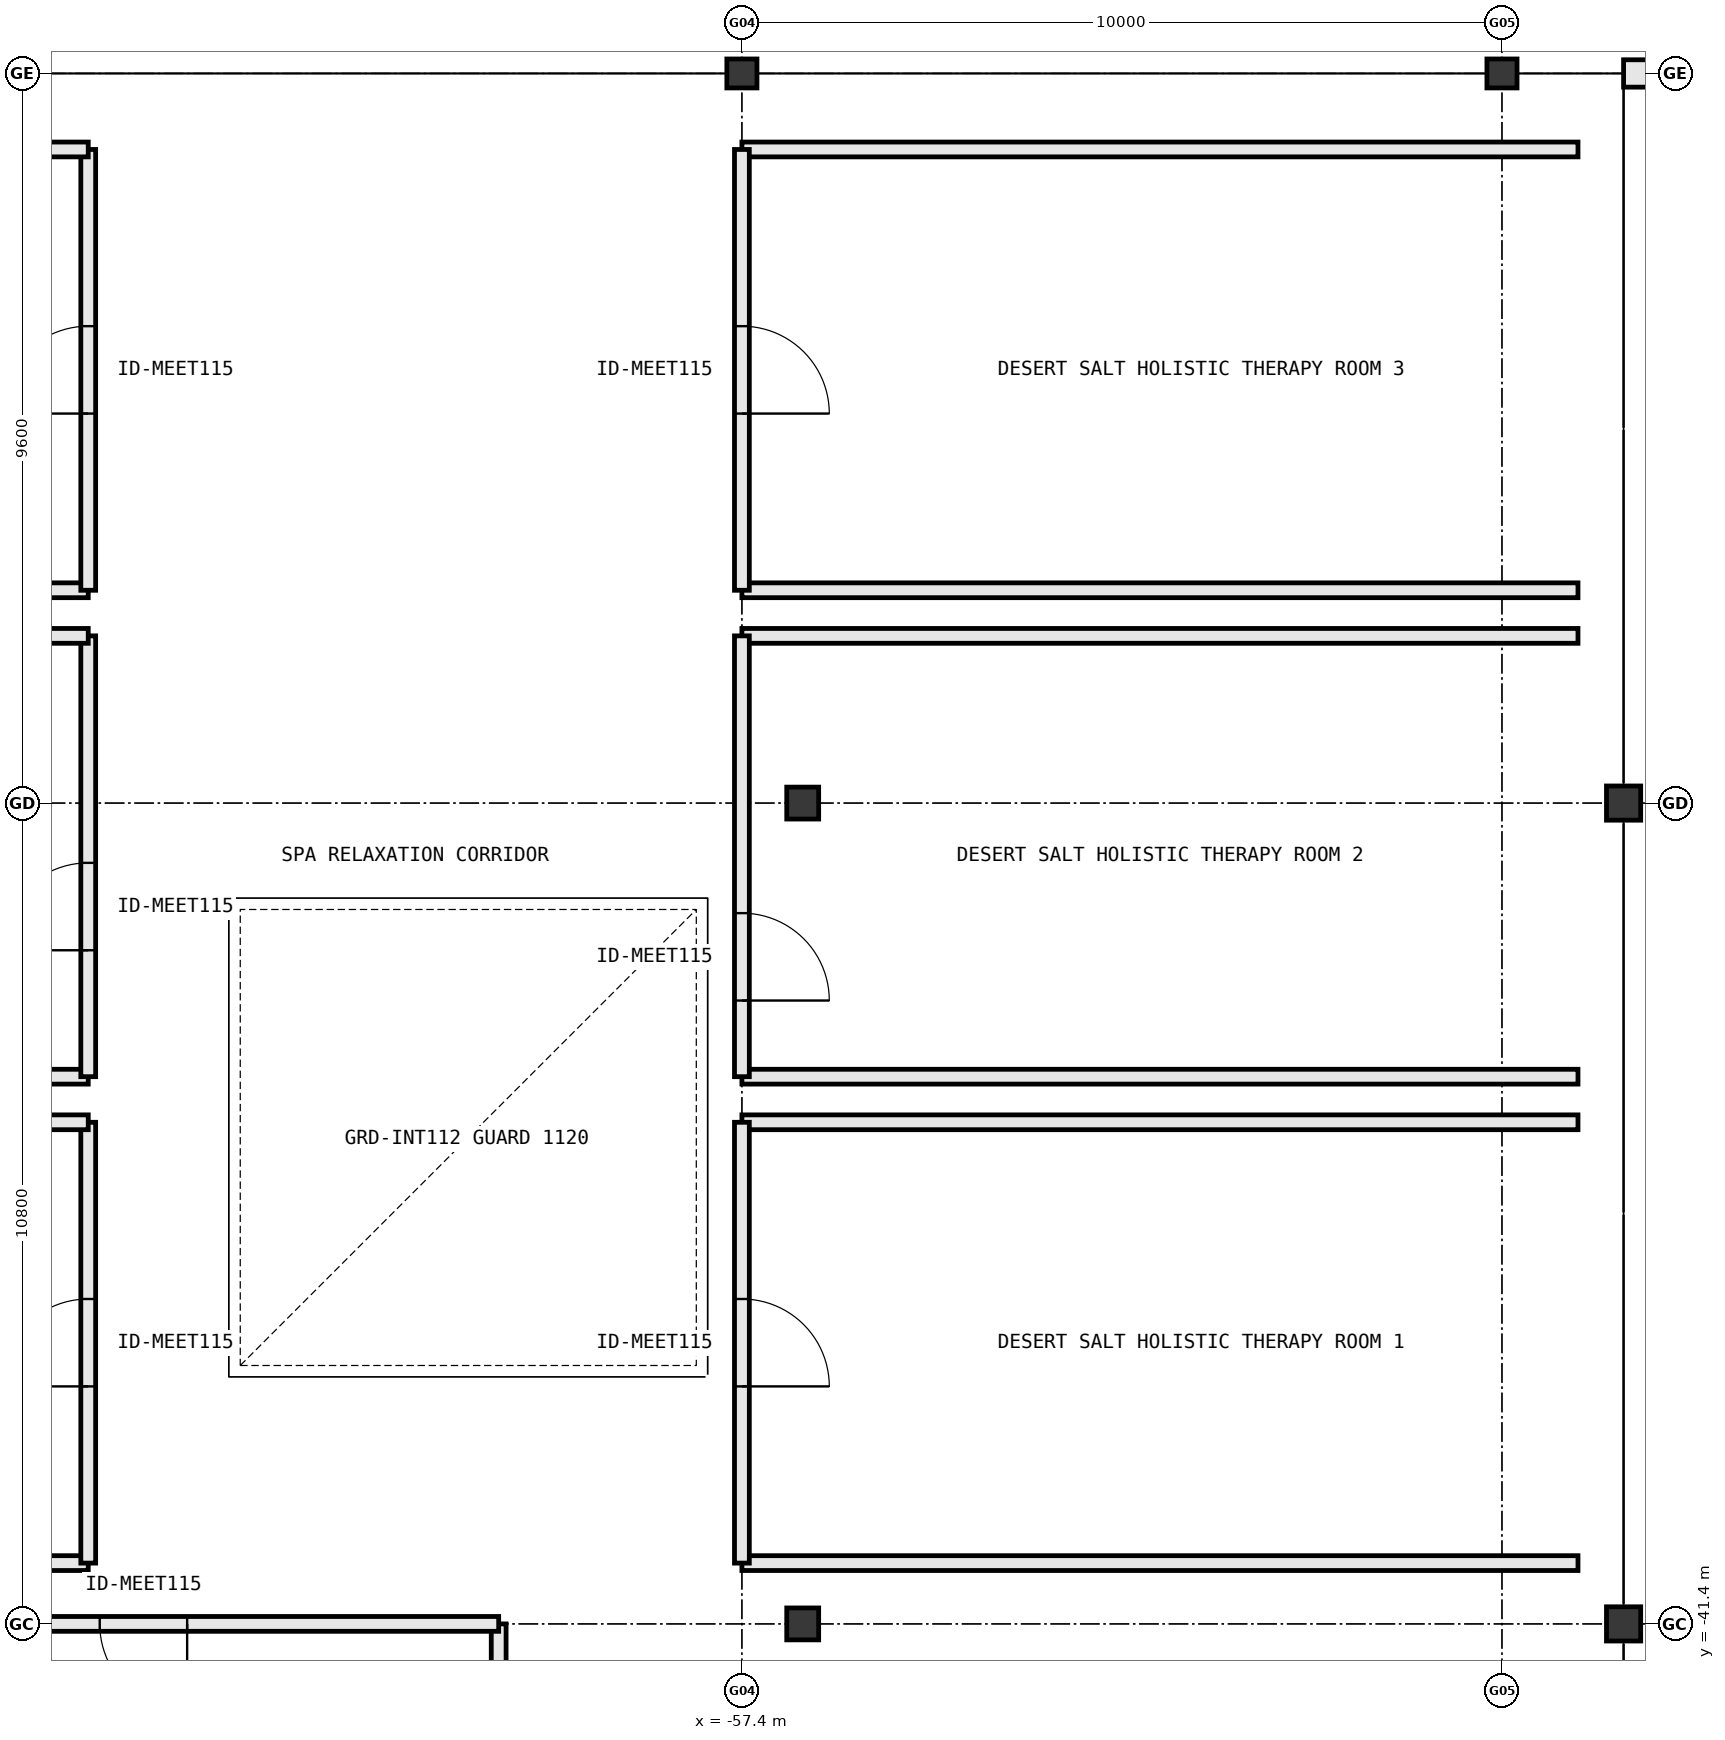
"""IFC4 building model, lengths in metres.
Left out: names, types, materials, properties, quantities, classifications, styles, units other than length and angle.
Written with IfcOpenShell. Run it as: python <this file> out.ifc"""

import sys

from ifc_helpers import new_model, si_unit, direction, frame, frame_2d, origin, origin_2d, place, context, subcontext, project, spatial, rectangle, i_section, extrude, element, fill, save


model = new_model("IFC4")
c1 = context("Model", 3, precision=1e-05, world=origin(), true_north=direction((0.0, 1.0)))
c2 = subcontext(c1, "Body", "Model", "MODEL_VIEW")
j1 = project(units=[si_unit("LENGTHUNIT", "METRE"), si_unit("PLANEANGLEUNIT", "RADIAN")], contexts=[c1])
p1 = place(None, origin())
s1 = spatial("IfcSite", under=j1, at=p1, CompositionType="ELEMENT")
p2 = place(p1, origin())
s2 = spatial("IfcBuilding", under=s1, at=p2, CompositionType="ELEMENT")
p3 = place(p2, frame((0.0, 0.0, 5.4)))
s3 = spatial("IfcBuildingStorey", under=s2, at=p3, CompositionType="ELEMENT", Elevation=5.4)
for number, where, z_axis, x_axis in (
    (1, (-57.4, -21.0, 0.0), (0.0, 0.0, 1.0), (1.0, 0.0, 0.0)),
    (2, (-47.4, -21.0, 0.0), (0.0, 0.0, 1.0), (1.0, 0.0, 0.0)),
):
    element("IfcColumn", number, at=place(p3, frame(where, z_axis=z_axis, x_axis=x_axis)), inside=s3, PredefinedType="COLUMN", context=c2, shape_type="SweptSolid", body=[
        extrude(i_section(OverallWidth=0.396, OverallDepth=0.381, WebThickness=0.019, FlangeThickness=0.03, at=origin_2d()), origin(), (0.0, 0.0, 1.0), 5.4),
    ])
for number, where, z_axis, x_axis in (
    (3, (-56.6, -41.4, 0.0), (0.0, 0.0, 1.0), (1.0, 0.0, 0.0)),
    (4, (-56.6, -30.6, 0.0), (0.0, 0.0, 1.0), (1.0, 0.0, 0.0)),
):
    element("IfcColumn", number, at=place(p3, frame(where, z_axis=z_axis, x_axis=x_axis)), inside=s3, PredefinedType="COLUMN", context=c2, shape_type="SweptSolid", body=[
        extrude(rectangle(XDim=0.42, YDim=0.42, at=origin_2d()), origin(), (0.0, 0.0, 1.0), 5.4),
    ])
for number, where, z_axis, x_axis in (
    (5, (-45.8, -41.4, 0.0), (0.0, 0.0, 1.0), (1.0, 0.0, 0.0)),
    (6, (-45.8, -30.6, 0.0), (0.0, 0.0, 1.0), (1.0, 0.0, 0.0)),
):
    element("IfcColumn", number, at=place(p3, frame(where, z_axis=z_axis, x_axis=x_axis)), inside=s3, PredefinedType="COLUMN", context=c2, shape_type="SweptSolid", body=[
        extrude(rectangle(XDim=0.45, YDim=0.45, at=origin_2d()), origin(), (0.0, 0.0, 1.0), 5.4),
    ])
p4 = place(p3, frame((-45.8, -21.0, 0.0), z_axis=(0.0, 0.0, 1.0), x_axis=(1.0, 0.0, 0.0)))
e7 = element("IfcWall", 7, at=p4, inside=s3, PredefinedType="STANDARD", context=c2, shape_type="SweptSolid", body=[
    extrude(rectangle(XDim=8.393, YDim=0.36, at=frame_2d((4.196, 0.0))), origin(), (0.0, 0.0, 1.0), 4.424),
])
p5 = place(p4, frame((2.846, 0.0, 0.85)))
e8 = element("IfcOpeningElement", 8, at=p5, cuts=e7, PredefinedType="OPENING", context=c2, shape_type="SweptSolid", body=[
    extrude(rectangle(XDim=2.7, YDim=2.15, at=frame_2d((1.35, 1.075))), frame((0.0, 0.192, 0.0), z_axis=(0.0, -1.0, 0.0), x_axis=(1.0, 0.0, 0.0)), (0.0, 0.0, 1.0), 0.384),
])
p6 = place(p3, frame((-77.6, -40.6, 0.0), z_axis=(0.0, 0.0, 1.0), x_axis=(1.0, 0.0, 0.0)))
e9 = element("IfcWall", 9, at=p6, inside=s3, PredefinedType="PARTITIONING", context=c2, shape_type="SweptSolid", body=[
    extrude(rectangle(XDim=11.6, YDim=0.195, at=frame_2d((5.8, 0.0))), origin(), (0.0, 0.0, 1.0), 5.13),
])
p7 = place(p3, frame((-66.0, -40.6, 0.0), z_axis=(0.0, 0.0, 1.0), x_axis=(0.0, 1.0, 0.0)))
e10 = element("IfcWall", 10, at=p7, inside=s3, PredefinedType="PARTITIONING", context=c2, shape_type="SweptSolid", body=[
    extrude(rectangle(XDim=5.8, YDim=0.195, at=frame_2d((2.9, 0.0))), origin(), (0.0, 0.0, 1.0), 5.13),
])
p8 = place(p7, frame((2.325, 0.0, 0.0)))
e11 = element("IfcOpeningElement", 11, at=p8, cuts=e10, PredefinedType="OPENING", context=c2, shape_type="SweptSolid", body=[
    extrude(rectangle(XDim=1.15, YDim=2.2, at=frame_2d((0.575, 1.1))), frame((0.0, 0.11, 0.0), z_axis=(0.0, -1.0, 0.0), x_axis=(1.0, 0.0, 0.0)), (0.0, 0.0, 1.0), 0.219),
])
p9 = place(p3, frame((-66.0, -34.8, 0.0), z_axis=(0.0, 0.0, 1.0), x_axis=(-1.0, 0.0, 0.0)))
e12 = element("IfcWall", 12, at=p9, inside=s3, PredefinedType="PARTITIONING", context=c2, shape_type="SweptSolid", body=[
    extrude(rectangle(XDim=11.6, YDim=0.195, at=frame_2d((5.8, 0.0))), origin(), (0.0, 0.0, 1.0), 5.13),
])
for number, where, z_axis, x_axis in (
    (13, (-57.4, -40.6, 0.0), (0.0, 0.0, 1.0), (1.0, 0.0, 0.0)),
    (14, (-46.4, -34.8, 0.0), (0.0, 0.0, 1.0), (-1.0, 0.0, 0.0)),
):
    element("IfcWall", number, at=place(p3, frame(where, z_axis=z_axis, x_axis=x_axis)), inside=s3, PredefinedType="PARTITIONING", context=c2, shape_type="SweptSolid", body=[
        extrude(rectangle(XDim=11.0, YDim=0.195, at=frame_2d((5.5, 0.0))), origin(), (0.0, 0.0, 1.0), 5.13),
    ])
p10 = place(p3, frame((-57.4, -34.8, 0.0), z_axis=(0.0, 0.0, 1.0), x_axis=(0.0, -1.0, 0.0)))
e15 = element("IfcWall", 15, at=p10, inside=s3, PredefinedType="PARTITIONING", context=c2, shape_type="SweptSolid", body=[
    extrude(rectangle(XDim=5.8, YDim=0.195, at=frame_2d((2.9, 0.0))), origin(), (0.0, 0.0, 1.0), 5.13),
])
p11 = place(p10, frame((2.325, 0.0, 0.0)))
e16 = element("IfcOpeningElement", 16, at=p11, cuts=e15, PredefinedType="OPENING", context=c2, shape_type="SweptSolid", body=[
    extrude(rectangle(XDim=1.15, YDim=2.2, at=frame_2d((0.575, 1.1))), frame((0.0, 0.11, 0.0), z_axis=(0.0, -1.0, 0.0), x_axis=(1.0, 0.0, 0.0)), (0.0, 0.0, 1.0), 0.219),
])
p12 = place(p3, frame((-77.6, -34.2, 0.0), z_axis=(0.0, 0.0, 1.0), x_axis=(1.0, 0.0, 0.0)))
e17 = element("IfcWall", 17, at=p12, inside=s3, PredefinedType="PARTITIONING", context=c2, shape_type="SweptSolid", body=[
    extrude(rectangle(XDim=11.6, YDim=0.195, at=frame_2d((5.8, 0.0))), origin(), (0.0, 0.0, 1.0), 5.13),
])
p13 = place(p3, frame((-66.0, -34.2, 0.0), z_axis=(0.0, 0.0, 1.0), x_axis=(0.0, 1.0, 0.0)))
e18 = element("IfcWall", 18, at=p13, inside=s3, PredefinedType="PARTITIONING", context=c2, shape_type="SweptSolid", body=[
    extrude(rectangle(XDim=5.8, YDim=0.195, at=frame_2d((2.9, 0.0))), origin(), (0.0, 0.0, 1.0), 5.13),
])
p14 = place(p13, frame((1.664, 0.0, 0.0)))
e19 = element("IfcOpeningElement", 19, at=p14, cuts=e18, PredefinedType="OPENING", context=c2, shape_type="SweptSolid", body=[
    extrude(rectangle(XDim=1.15, YDim=2.2, at=frame_2d((0.575, 1.1))), frame((0.0, 0.11, 0.0), z_axis=(0.0, -1.0, 0.0), x_axis=(1.0, 0.0, 0.0)), (0.0, 0.0, 1.0), 0.219),
])
p15 = place(p3, frame((-66.0, -28.4, 0.0), z_axis=(0.0, 0.0, 1.0), x_axis=(-1.0, 0.0, 0.0)))
e20 = element("IfcWall", 20, at=p15, inside=s3, PredefinedType="PARTITIONING", context=c2, shape_type="SweptSolid", body=[
    extrude(rectangle(XDim=11.6, YDim=0.195, at=frame_2d((5.8, 0.0))), origin(), (0.0, 0.0, 1.0), 5.13),
])
for number, where, z_axis, x_axis in (
    (21, (-57.4, -34.2, 0.0), (0.0, 0.0, 1.0), (1.0, 0.0, 0.0)),
    (22, (-46.4, -28.4, 0.0), (0.0, 0.0, 1.0), (-1.0, 0.0, 0.0)),
):
    element("IfcWall", number, at=place(p3, frame(where, z_axis=z_axis, x_axis=x_axis)), inside=s3, PredefinedType="PARTITIONING", context=c2, shape_type="SweptSolid", body=[
        extrude(rectangle(XDim=11.0, YDim=0.195, at=frame_2d((5.5, 0.0))), origin(), (0.0, 0.0, 1.0), 5.13),
    ])
p16 = place(p3, frame((-57.4, -28.4, 0.0), z_axis=(0.0, 0.0, 1.0), x_axis=(0.0, -1.0, 0.0)))
e23 = element("IfcWall", 23, at=p16, inside=s3, PredefinedType="PARTITIONING", context=c2, shape_type="SweptSolid", body=[
    extrude(rectangle(XDim=5.8, YDim=0.195, at=frame_2d((2.9, 0.0))), origin(), (0.0, 0.0, 1.0), 5.13),
])
p17 = place(p16, frame((3.648, 0.0, 0.0)))
e24 = element("IfcOpeningElement", 24, at=p17, cuts=e23, PredefinedType="OPENING", context=c2, shape_type="SweptSolid", body=[
    extrude(rectangle(XDim=1.15, YDim=2.2, at=frame_2d((0.575, 1.1))), frame((0.0, 0.11, 0.0), z_axis=(0.0, -1.0, 0.0), x_axis=(1.0, 0.0, 0.0)), (0.0, 0.0, 1.0), 0.219),
])
p18 = place(p3, frame((-77.6, -27.8, 0.0), z_axis=(0.0, 0.0, 1.0), x_axis=(1.0, 0.0, 0.0)))
e25 = element("IfcWall", 25, at=p18, inside=s3, PredefinedType="PARTITIONING", context=c2, shape_type="SweptSolid", body=[
    extrude(rectangle(XDim=11.6, YDim=0.195, at=frame_2d((5.8, 0.0))), origin(), (0.0, 0.0, 1.0), 5.13),
])
p19 = place(p3, frame((-66.0, -27.8, 0.0), z_axis=(0.0, 0.0, 1.0), x_axis=(0.0, 1.0, 0.0)))
e26 = element("IfcWall", 26, at=p19, inside=s3, PredefinedType="PARTITIONING", context=c2, shape_type="SweptSolid", body=[
    extrude(rectangle(XDim=5.8, YDim=0.195, at=frame_2d((2.9, 0.0))), origin(), (0.0, 0.0, 1.0), 5.13),
])
p20 = place(p19, frame((2.325, 0.0, 0.0)))
e27 = element("IfcOpeningElement", 27, at=p20, cuts=e26, PredefinedType="OPENING", context=c2, shape_type="SweptSolid", body=[
    extrude(rectangle(XDim=1.15, YDim=2.2, at=frame_2d((0.575, 1.1))), frame((0.0, 0.11, 0.0), z_axis=(0.0, -1.0, 0.0), x_axis=(1.0, 0.0, 0.0)), (0.0, 0.0, 1.0), 0.219),
])
p21 = place(p3, frame((-66.0, -22.0, 0.0), z_axis=(0.0, 0.0, 1.0), x_axis=(-1.0, 0.0, 0.0)))
e28 = element("IfcWall", 28, at=p21, inside=s3, PredefinedType="PARTITIONING", context=c2, shape_type="SweptSolid", body=[
    extrude(rectangle(XDim=11.6, YDim=0.195, at=frame_2d((5.8, 0.0))), origin(), (0.0, 0.0, 1.0), 5.13),
])
for number, where, z_axis, x_axis in (
    (29, (-57.4, -27.8, 0.0), (0.0, 0.0, 1.0), (1.0, 0.0, 0.0)),
    (30, (-46.4, -22.0, 0.0), (0.0, 0.0, 1.0), (-1.0, 0.0, 0.0)),
):
    element("IfcWall", number, at=place(p3, frame(where, z_axis=z_axis, x_axis=x_axis)), inside=s3, PredefinedType="PARTITIONING", context=c2, shape_type="SweptSolid", body=[
        extrude(rectangle(XDim=11.0, YDim=0.195, at=frame_2d((5.5, 0.0))), origin(), (0.0, 0.0, 1.0), 5.13),
    ])
p22 = place(p3, frame((-57.4, -22.0, 0.0), z_axis=(0.0, 0.0, 1.0), x_axis=(0.0, -1.0, 0.0)))
e31 = element("IfcWall", 31, at=p22, inside=s3, PredefinedType="PARTITIONING", context=c2, shape_type="SweptSolid", body=[
    extrude(rectangle(XDim=5.8, YDim=0.195, at=frame_2d((2.9, 0.0))), origin(), (0.0, 0.0, 1.0), 5.13),
])
p23 = place(p22, frame((2.325, 0.0, 0.0)))
e32 = element("IfcOpeningElement", 32, at=p23, cuts=e31, PredefinedType="OPENING", context=c2, shape_type="SweptSolid", body=[
    extrude(rectangle(XDim=1.15, YDim=2.2, at=frame_2d((0.575, 1.1))), frame((0.0, 0.11, 0.0), z_axis=(0.0, -1.0, 0.0), x_axis=(1.0, 0.0, 0.0)), (0.0, 0.0, 1.0), 0.219),
])
p24 = place(p3, frame((-60.6, -51.6, 0.0), z_axis=(0.0, 0.0, 1.0), x_axis=(0.0, 1.0, 0.0)))
e33 = element("IfcWall", 33, at=p24, inside=s3, PredefinedType="PARTITIONING", context=c2, shape_type="SweptSolid", body=[
    extrude(rectangle(XDim=10.2, YDim=0.195, at=frame_2d((5.1, 0.0))), origin(), (0.0, 0.0, 1.0), 5.13),
])
p25 = place(p3, frame((-60.6, -41.4, 0.0), z_axis=(0.0, 0.0, 1.0), x_axis=(-1.0, 0.0, 0.0)))
e34 = element("IfcWall", 34, at=p25, inside=s3, PredefinedType="PARTITIONING", context=c2, shape_type="SweptSolid", body=[
    extrude(rectangle(XDim=12.0, YDim=0.195, at=frame_2d((6.0, 0.0))), origin(), (0.0, 0.0, 1.0), 4.346),
])
p26 = place(p25, frame((4.099, 0.0, 0.0)))
e35 = element("IfcOpeningElement", 35, at=p26, cuts=e34, PredefinedType="OPENING", context=c2, shape_type="SweptSolid", body=[
    extrude(rectangle(XDim=1.15, YDim=2.2, at=frame_2d((0.575, 1.1))), frame((0.0, 0.11, 0.0), z_axis=(0.0, -1.0, 0.0), x_axis=(1.0, 0.0, 0.0)), (0.0, 0.0, 1.0), 0.219),
])
p27 = place(p8, origin())
e36 = element("IfcDoor", 36, at=p27, inside=s3, OperationType="SINGLE_SWING_LEFT", PredefinedType="DOOR", context=c2, shape_type="SweptSolid", body=[
    extrude(rectangle(XDim=1.15, YDim=2.2, at=frame_2d((0.575, 1.1))), frame((0.0, 0.025, 0.0), z_axis=(0.0, -1.0, 0.0), x_axis=(1.0, 0.0, 0.0)), (0.0, 0.0, 1.0), 0.05),
])
fill(e11, e36)
p28 = place(p11, origin())
e37 = element("IfcDoor", 37, at=p28, inside=s3, OperationType="SINGLE_SWING_RIGHT", PredefinedType="DOOR", context=c2, shape_type="SweptSolid", body=[
    extrude(rectangle(XDim=1.15, YDim=2.2, at=frame_2d((0.575, 1.1))), frame((0.0, 0.025, 0.0), z_axis=(0.0, -1.0, 0.0), x_axis=(1.0, 0.0, 0.0)), (0.0, 0.0, 1.0), 0.05),
])
fill(e16, e37)
p29 = place(p14, origin())
e38 = element("IfcDoor", 38, at=p29, inside=s3, OperationType="SINGLE_SWING_LEFT", PredefinedType="DOOR", context=c2, shape_type="SweptSolid", body=[
    extrude(rectangle(XDim=1.15, YDim=2.2, at=frame_2d((0.575, 1.1))), frame((0.0, 0.025, 0.0), z_axis=(0.0, -1.0, 0.0), x_axis=(1.0, 0.0, 0.0)), (0.0, 0.0, 1.0), 0.05),
])
fill(e19, e38)
p30 = place(p17, origin())
e39 = element("IfcDoor", 39, at=p30, inside=s3, OperationType="SINGLE_SWING_RIGHT", PredefinedType="DOOR", context=c2, shape_type="SweptSolid", body=[
    extrude(rectangle(XDim=1.15, YDim=2.2, at=frame_2d((0.575, 1.1))), frame((0.0, 0.025, 0.0), z_axis=(0.0, -1.0, 0.0), x_axis=(1.0, 0.0, 0.0)), (0.0, 0.0, 1.0), 0.05),
])
fill(e24, e39)
p31 = place(p20, origin())
e40 = element("IfcDoor", 40, at=p31, inside=s3, OperationType="SINGLE_SWING_LEFT", PredefinedType="DOOR", context=c2, shape_type="SweptSolid", body=[
    extrude(rectangle(XDim=1.15, YDim=2.2, at=frame_2d((0.575, 1.1))), frame((0.0, 0.025, 0.0), z_axis=(0.0, -1.0, 0.0), x_axis=(1.0, 0.0, 0.0)), (0.0, 0.0, 1.0), 0.05),
])
fill(e27, e40)
p32 = place(p23, origin())
e41 = element("IfcDoor", 41, at=p32, inside=s3, OperationType="SINGLE_SWING_RIGHT", PredefinedType="DOOR", context=c2, shape_type="SweptSolid", body=[
    extrude(rectangle(XDim=1.15, YDim=2.2, at=frame_2d((0.575, 1.1))), frame((0.0, 0.025, 0.0), z_axis=(0.0, -1.0, 0.0), x_axis=(1.0, 0.0, 0.0)), (0.0, 0.0, 1.0), 0.05),
])
fill(e32, e41)
p33 = place(p26, origin())
e42 = element("IfcDoor", 42, at=p33, inside=s3, OperationType="SINGLE_SWING_LEFT", PredefinedType="DOOR", context=c2, shape_type="SweptSolid", body=[
    extrude(rectangle(XDim=1.15, YDim=2.2, at=frame_2d((0.575, 1.1))), frame((0.0, 0.025, 0.0), z_axis=(0.0, -1.0, 0.0), x_axis=(1.0, 0.0, 0.0)), (0.0, 0.0, 1.0), 0.05),
])
fill(e35, e42)
save(model, sys.argv[1])
